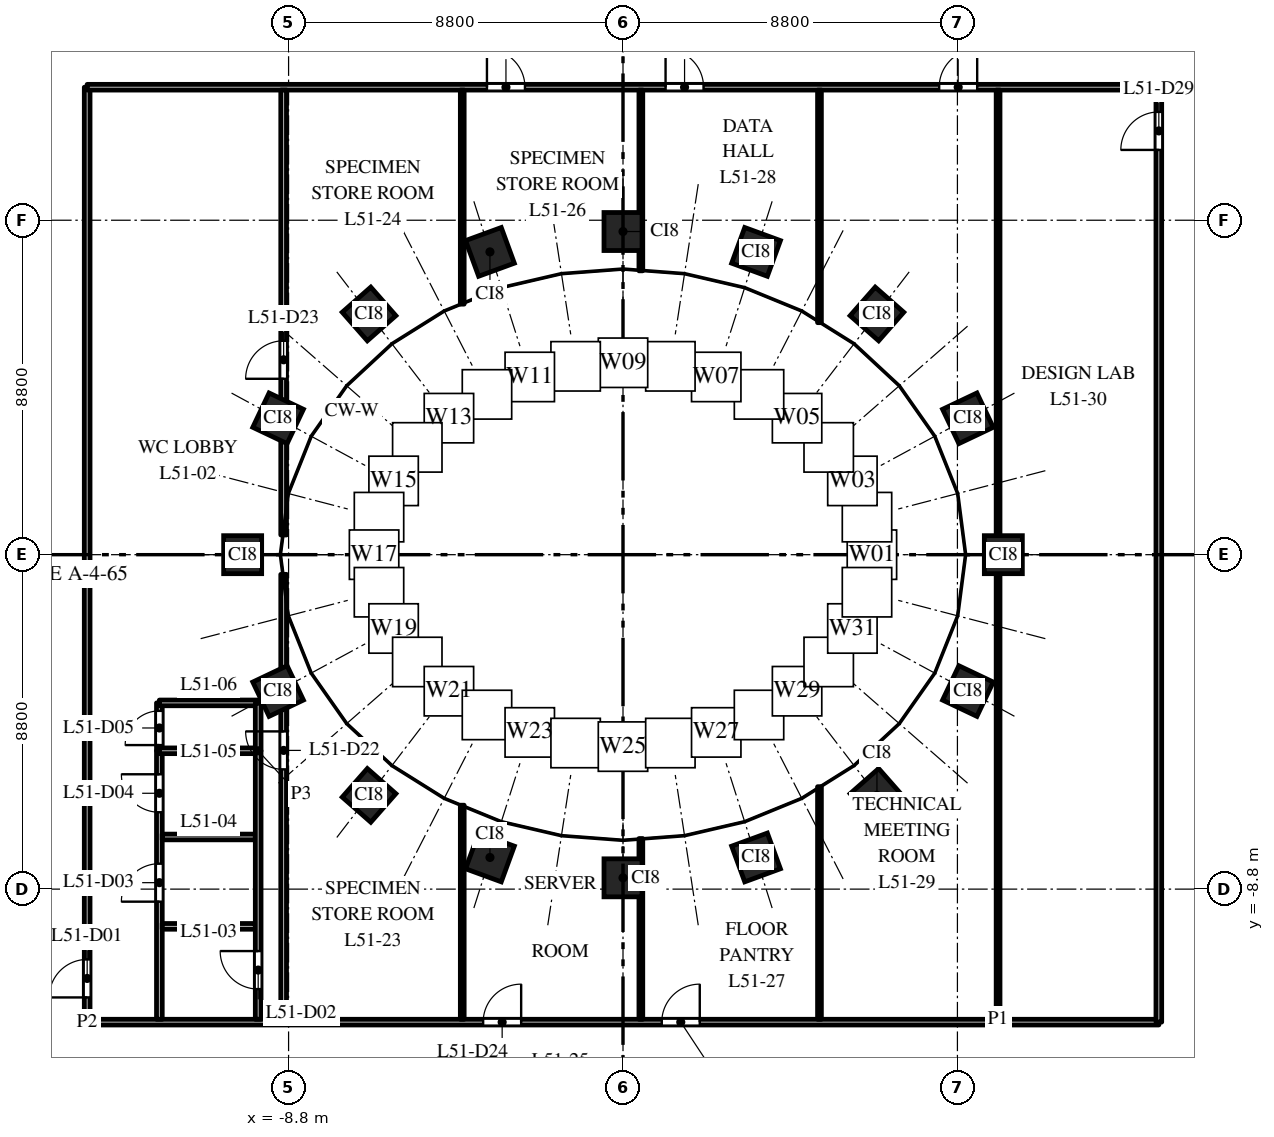
"""IFC4 building model, lengths in metres.
Left out: names, types, materials, properties, quantities, classifications, styles, units other than length and angle.
Written with IfcOpenShell. Run it as: python <this file> out.ifc"""

import sys

from ifc_helpers import new_model, si_unit, direction, frame, frame_2d, origin, origin_2d, place, context, subcontext, project, spatial, rectangle, extrude, element, fill, save


model = new_model("IFC4")
c1 = context("Model", 3, precision=1e-05, world=origin(), true_north=direction((0.0, 1.0)))
c2 = subcontext(c1, "Body", "Model", "MODEL_VIEW")
j1 = project(units=[si_unit("LENGTHUNIT", "METRE"), si_unit("PLANEANGLEUNIT", "RADIAN")], contexts=[c1])
p1 = place(None, origin())
s1 = spatial("IfcSite", under=j1, at=p1, CompositionType="ELEMENT")
p2 = place(p1, origin())
s2 = spatial("IfcBuilding", under=s1, at=p2, CompositionType="ELEMENT")
p3 = place(p2, frame((0.0, 0.0, 245.5)))
s3 = spatial("IfcBuildingStorey", under=s2, at=p3, CompositionType="ELEMENT", Elevation=245.5)
for number, where, z_axis, x_axis in (
    (1, (10.008, 0.0, 0.0), (0.0, 0.0, 1.0), (0.0, 1.0, 0.0)),
    (2, (9.076, 3.588, 0.0), (0.0, 0.0, 1.0), (-0.429, 0.903, 0.0)),
    (3, (6.682, 6.334, 0.0), (0.0, 0.0, 1.0), (-0.751, 0.66, 0.0)),
    (4, (3.501, 7.967, 0.0), (0.0, 0.0, 1.0), (-0.939, 0.344, 0.0)),
    (5, (0.0, 8.503, 0.0), (0.0, 0.0, 1.0), (-1.0, 0.0, 0.0)),
    (6, (-3.501, 7.967, 0.0), (0.0, 0.0, 1.0), (-0.939, -0.344, 0.0)),
    (7, (-6.682, 6.334, 0.0), (0.0, 0.0, 1.0), (-0.751, -0.66, 0.0)),
    (8, (-9.076, 3.588, 0.0), (0.0, 0.0, 1.0), (-0.429, -0.903, 0.0)),
    (9, (-10.008, 0.0, 0.0), (0.0, 0.0, 1.0), (0.0, -1.0, 0.0)),
    (10, (-9.076, -3.588, 0.0), (0.0, 0.0, 1.0), (0.429, -0.903, 0.0)),
    (11, (-6.682, -6.334, 0.0), (0.0, 0.0, 1.0), (0.751, -0.66, 0.0)),
    (12, (-3.501, -7.967, 0.0), (0.0, 0.0, 1.0), (0.939, -0.344, 0.0)),
    (13, (0.0, -8.503, 0.0), (0.0, 0.0, 1.0), (1.0, 0.0, 0.0)),
    (14, (3.501, -7.967, 0.0), (0.0, 0.0, 1.0), (0.939, 0.344, 0.0)),
    (15, (6.682, -6.334, 0.0), (0.0, 0.0, 1.0), (0.751, 0.66, 0.0)),
    (16, (9.076, -3.588, 0.0), (0.0, 0.0, 1.0), (0.429, 0.903, 0.0)),
):
    element("IfcColumn", number, at=place(p3, frame(where, z_axis=z_axis, x_axis=x_axis)), inside=s3, PredefinedType="COLUMN", context=c2, shape_type="SweptSolid", body=[
        extrude(rectangle(XDim=1.0, YDim=1.0, at=origin_2d()), origin(), (0.0, 0.0, 1.0), 4.0),
    ])
p4 = place(p3, frame((-14.1, -12.3, 0.0), z_axis=(0.0, 0.0, 1.0), x_axis=(0.0, 1.0, 0.0)))
e17 = element("IfcWall", 17, at=p4, inside=s3, PredefinedType="PARTITIONING", context=c2, shape_type="SweptSolid", body=[
    extrude(rectangle(XDim=24.6, YDim=0.15, at=frame_2d((12.3, 0.0))), origin(), (0.0, 0.0, 1.0), 2.75),
])
p5 = place(p4, frame((0.65, 0.0, 0.0)))
e18 = element("IfcOpeningElement", 18, at=p5, cuts=e17, PredefinedType="OPENING", context=c2, shape_type="SweptSolid", body=[
    extrude(rectangle(XDim=1.0, YDim=2.1, at=frame_2d((0.5, 1.05))), frame((0.0, 0.085, 0.0), z_axis=(0.0, -1.0, 0.0), x_axis=(1.0, 0.0, 0.0)), (0.0, 0.0, 1.0), 0.17),
])
p6 = place(p3, frame((-14.1, -12.3, 0.0), z_axis=(0.0, 0.0, 1.0), x_axis=(1.0, 0.0, 0.0)))
e19 = element("IfcWall", 19, at=p6, inside=s3, PredefinedType="PARTITIONING", context=c2, shape_type="SweptSolid", body=[
    extrude(rectangle(XDim=28.2, YDim=0.15, at=frame_2d((14.1, 0.0))), origin(), (0.0, 0.0, 1.0), 2.85),
])
p7 = place(p6, frame((10.42, 0.0, 0.0)))
e20 = element("IfcOpeningElement", 20, at=p7, cuts=e19, PredefinedType="OPENING", context=c2, shape_type="SweptSolid", body=[
    extrude(rectangle(XDim=1.0, YDim=2.1, at=frame_2d((0.5, 1.05))), frame((0.0, 0.085, 0.0), z_axis=(0.0, -1.0, 0.0), x_axis=(1.0, 0.0, 0.0)), (0.0, 0.0, 1.0), 0.17),
])
p8 = place(p6, frame((15.12, 0.0, 0.0)))
e21 = element("IfcOpeningElement", 21, at=p8, cuts=e19, PredefinedType="OPENING", context=c2, shape_type="SweptSolid", body=[
    extrude(rectangle(XDim=1.0, YDim=2.1, at=frame_2d((0.5, 1.05))), frame((0.0, 0.085, 0.0), z_axis=(0.0, -1.0, 0.0), x_axis=(1.0, 0.0, 0.0)), (0.0, 0.0, 1.0), 0.17),
])
p9 = place(p3, frame((-14.1, 12.3, 0.0), z_axis=(0.0, 0.0, 1.0), x_axis=(1.0, 0.0, 0.0)))
e22 = element("IfcWall", 22, at=p9, inside=s3, PredefinedType="PARTITIONING", context=c2, shape_type="SweptSolid", body=[
    extrude(rectangle(XDim=28.2, YDim=0.15, at=frame_2d((14.1, 0.0))), origin(), (0.0, 0.0, 1.0), 2.85),
])
p10 = place(p9, frame((10.52, 0.0, 0.0)))
e23 = element("IfcOpeningElement", 23, at=p10, cuts=e22, PredefinedType="OPENING", context=c2, shape_type="SweptSolid", body=[
    extrude(rectangle(XDim=1.0, YDim=2.1, at=frame_2d((0.5, 1.05))), frame((0.0, 0.085, 0.0), z_axis=(0.0, -1.0, 0.0), x_axis=(1.0, 0.0, 0.0)), (0.0, 0.0, 1.0), 0.17),
])
p11 = place(p9, frame((15.22, 0.0, 0.0)))
e24 = element("IfcOpeningElement", 24, at=p11, cuts=e22, PredefinedType="OPENING", context=c2, shape_type="SweptSolid", body=[
    extrude(rectangle(XDim=1.0, YDim=2.1, at=frame_2d((0.5, 1.05))), frame((0.0, 0.085, 0.0), z_axis=(0.0, -1.0, 0.0), x_axis=(1.0, 0.0, 0.0)), (0.0, 0.0, 1.0), 0.17),
])
p12 = place(p9, frame((22.42, 0.0, 0.0)))
e25 = element("IfcOpeningElement", 25, at=p12, cuts=e22, PredefinedType="OPENING", context=c2, shape_type="SweptSolid", body=[
    extrude(rectangle(XDim=1.0, YDim=2.1, at=frame_2d((0.5, 1.05))), frame((0.0, 0.085, 0.0), z_axis=(0.0, -1.0, 0.0), x_axis=(1.0, 0.0, 0.0)), (0.0, 0.0, 1.0), 0.17),
])
p13 = place(p3, frame((-12.2, -12.225, 0.0), z_axis=(0.0, 0.0, 1.0), x_axis=(0.0, 1.0, 0.0)))
e26 = element("IfcWall", 26, at=p13, inside=s3, PredefinedType="PARTITIONING", context=c2, shape_type="SweptSolid", body=[
    extrude(rectangle(XDim=7.065, YDim=0.15, at=frame_2d((3.533, 0.0))), origin(), (0.0, 0.0, 1.0), 2.75),
])
p14 = place(p13, frame((3.095, 0.0, 0.0)))
e27 = element("IfcOpeningElement", 27, at=p14, cuts=e26, PredefinedType="OPENING", context=c2, shape_type="SweptSolid", body=[
    extrude(rectangle(XDim=1.0, YDim=2.1, at=frame_2d((0.5, 1.05))), frame((0.0, 0.085, 0.0), z_axis=(0.0, -1.0, 0.0), x_axis=(1.0, 0.0, 0.0)), (0.0, 0.0, 1.0), 0.17),
])
p15 = place(p13, frame((5.447, 0.0, 0.0)))
e28 = element("IfcOpeningElement", 28, at=p15, cuts=e26, PredefinedType="OPENING", context=c2, shape_type="SweptSolid", body=[
    extrude(rectangle(XDim=1.0, YDim=2.1, at=frame_2d((0.5, 1.05))), frame((0.0, 0.085, 0.0), z_axis=(0.0, -1.0, 0.0), x_axis=(1.0, 0.0, 0.0)), (0.0, 0.0, 1.0), 0.17),
])
p16 = place(p3, frame((-12.125, -9.78, 0.0), z_axis=(0.0, 0.0, 1.0), x_axis=(1.0, 0.0, 0.0)))
e29 = element("IfcWall", 29, at=p16, inside=s3, PredefinedType="PARTITIONING", context=c2, shape_type="SweptSolid", body=[
    extrude(rectangle(XDim=2.45, YDim=0.15, at=frame_2d((1.225, 0.0))), origin(), (0.0, 0.0, 1.0), 3.7),
])
p17 = place(p3, frame((-12.125, -7.428, 0.0), z_axis=(0.0, 0.0, 1.0), x_axis=(1.0, 0.0, 0.0)))
e30 = element("IfcWall", 30, at=p17, inside=s3, PredefinedType="PARTITIONING", context=c2, shape_type="SweptSolid", body=[
    extrude(rectangle(XDim=2.45, YDim=0.15, at=frame_2d((1.225, 0.0))), origin(), (0.0, 0.0, 1.0), 2.75),
])
p18 = place(p3, frame((-12.2, -5.16, 0.0), z_axis=(0.0, 0.0, 1.0), x_axis=(0.0, 1.0, 0.0)))
e31 = element("IfcWall", 31, at=p18, inside=s3, PredefinedType="PARTITIONING", context=c2, shape_type="SweptSolid", body=[
    extrude(rectangle(XDim=1.26, YDim=0.15, at=frame_2d((0.63, 0.0))), origin(), (0.0, 0.0, 1.0), 3.7),
])
p19 = place(p18, frame((0.15, 0.0, 0.0)))
e32 = element("IfcOpeningElement", 32, at=p19, cuts=e31, PredefinedType="OPENING", context=c2, shape_type="SweptSolid", body=[
    extrude(rectangle(XDim=0.9, YDim=2.1, at=frame_2d((0.45, 1.05))), frame((0.0, 0.085, 0.0), z_axis=(0.0, -1.0, 0.0), x_axis=(1.0, 0.0, 0.0)), (0.0, 0.0, 1.0), 0.17),
])
p20 = place(p3, frame((-12.2, -5.16, 0.0), z_axis=(0.0, 0.0, 1.0), x_axis=(1.0, 0.0, 0.0)))
e33 = element("IfcWall", 33, at=p20, inside=s3, PredefinedType="PARTITIONING", context=c2, shape_type="SweptSolid", body=[
    extrude(rectangle(XDim=2.6, YDim=0.15, at=frame_2d((1.3, 0.0))), origin(), (0.0, 0.0, 1.0), 3.7),
])
p21 = place(p3, frame((-12.2, -3.9, 0.0), z_axis=(0.0, 0.0, 1.0), x_axis=(1.0, 0.0, 0.0)))
e34 = element("IfcWall", 34, at=p21, inside=s3, PredefinedType="PARTITIONING", context=c2, shape_type="SweptSolid", body=[
    extrude(rectangle(XDim=2.596, YDim=0.15, at=frame_2d((1.298, 0.0))), origin(), (0.0, 0.0, 1.0), 3.7),
])
p22 = place(p3, frame((-9.6, -12.225, 0.0), z_axis=(0.0, 0.0, 1.0), x_axis=(0.0, 1.0, 0.0)))
e35 = element("IfcWall", 35, at=p22, inside=s3, PredefinedType="PARTITIONING", context=c2, shape_type="SweptSolid", body=[
    extrude(rectangle(XDim=7.065, YDim=0.15, at=frame_2d((3.533, 0.0))), origin(), (0.0, 0.0, 1.0), 2.75),
])
p23 = place(p22, frame((0.795, 0.0, 0.0)))
e36 = element("IfcOpeningElement", 36, at=p23, cuts=e35, PredefinedType="OPENING", context=c2, shape_type="SweptSolid", body=[
    extrude(rectangle(XDim=1.0, YDim=2.1, at=frame_2d((0.5, 1.05))), frame((0.0, 0.085, 0.0), z_axis=(0.0, -1.0, 0.0), x_axis=(1.0, 0.0, 0.0)), (0.0, 0.0, 1.0), 0.17),
])
p24 = place(p3, frame((-9.6, -5.16, 0.0), z_axis=(0.0, 0.0, 1.0), x_axis=(0.0, 1.0, 0.0)))
e37 = element("IfcWall", 37, at=p24, inside=s3, PredefinedType="PARTITIONING", context=c2, shape_type="SweptSolid", body=[
    extrude(rectangle(XDim=1.256, YDim=0.15, at=frame_2d((0.628, 0.0))), origin(), (0.0, 0.0, 1.0), 3.7),
])
p25 = place(p3, frame((-8.93, -12.225, 0.0), z_axis=(0.0, 0.0, 1.0), x_axis=(0.0, 1.0, 0.0)))
e38 = element("IfcWall", 38, at=p25, inside=s3, PredefinedType="PARTITIONING", context=c2, shape_type="SweptSolid", body=[
    extrude(rectangle(XDim=11.707, YDim=0.15, at=frame_2d((5.854, 0.0))), origin(), (0.0, 0.0, 1.0), 2.75),
])
p26 = place(p25, frame((6.575, 0.0, 0.0)))
e39 = element("IfcOpeningElement", 39, at=p26, cuts=e38, PredefinedType="OPENING", context=c2, shape_type="SweptSolid", body=[
    extrude(rectangle(XDim=1.0, YDim=2.1, at=frame_2d((0.5, 1.05))), frame((0.0, 0.085, 0.0), z_axis=(0.0, -1.0, 0.0), x_axis=(1.0, 0.0, 0.0)), (0.0, 0.0, 1.0), 0.17),
])
p27 = place(p3, frame((-8.93, 0.518, 0.0), z_axis=(0.0, 0.0, 1.0), x_axis=(0.0, 1.0, 0.0)))
e40 = element("IfcWall", 40, at=p27, inside=s3, PredefinedType="PARTITIONING", context=c2, shape_type="SweptSolid", body=[
    extrude(rectangle(XDim=11.707, YDim=0.15, at=frame_2d((5.854, 0.0))), origin(), (0.0, 0.0, 1.0), 2.75),
])
p28 = place(p27, frame((4.11, 0.0, 0.0)))
e41 = element("IfcOpeningElement", 41, at=p28, cuts=e40, PredefinedType="OPENING", context=c2, shape_type="SweptSolid", body=[
    extrude(rectangle(XDim=1.0, YDim=2.1, at=frame_2d((0.5, 1.05))), frame((0.0, 0.085, 0.0), z_axis=(0.0, -1.0, 0.0), x_axis=(1.0, 0.0, 0.0)), (0.0, 0.0, 1.0), 0.17),
])
for number, where, z_axis, x_axis in (
    (42, (-4.23, -12.225, 0.0), (0.0, 0.0, 1.0), (0.0, 1.0, 0.0)),
    (43, (-4.23, 6.592, 0.0), (0.0, 0.0, 1.0), (0.0, 1.0, 0.0)),
):
    element("IfcWall", number, at=place(p3, frame(where, z_axis=z_axis, x_axis=x_axis)), inside=s3, PredefinedType="PARTITIONING", context=c2, shape_type="SweptSolid", body=[
        extrude(rectangle(XDim=5.633, YDim=0.1, at=frame_2d((2.816, 0.0))), origin(), (0.0, 0.0, 1.0), 2.85),
    ])
for number, where, z_axis, x_axis in (
    (44, (0.47, -12.225, 0.0), (0.0, 0.0, 1.0), (0.0, 1.0, 0.0)),
    (45, (0.47, 7.469, 0.0), (0.0, 0.0, 1.0), (0.0, 1.0, 0.0)),
):
    element("IfcWall", number, at=place(p3, frame(where, z_axis=z_axis, x_axis=x_axis)), inside=s3, PredefinedType="PARTITIONING", context=c2, shape_type="SweptSolid", body=[
        extrude(rectangle(XDim=4.756, YDim=0.1, at=frame_2d((2.378, 0.0))), origin(), (0.0, 0.0, 1.0), 3.0),
    ])
for number, where, z_axis, x_axis in (
    (46, (5.17, -12.225, 0.0), (0.0, 0.0, 1.0), (0.0, 1.0, 0.0)),
    (47, (5.17, 6.105, 0.0), (0.0, 0.0, 1.0), (0.0, 1.0, 0.0)),
):
    element("IfcWall", number, at=place(p3, frame(where, z_axis=z_axis, x_axis=x_axis)), inside=s3, PredefinedType="PARTITIONING", context=c2, shape_type="SweptSolid", body=[
        extrude(rectangle(XDim=6.12, YDim=0.1, at=frame_2d((3.06, 0.0))), origin(), (0.0, 0.0, 1.0), 2.85),
    ])
p29 = place(p3, frame((9.87, -12.225, 0.0), z_axis=(0.0, 0.0, 1.0), x_axis=(0.0, 1.0, 0.0)))
e48 = element("IfcWall", 48, at=p29, inside=s3, PredefinedType="PARTITIONING", context=c2, shape_type="SweptSolid", body=[
    extrude(rectangle(XDim=24.45, YDim=0.1, at=frame_2d((12.225, 0.0))), origin(), (0.0, 0.0, 1.0), 2.75),
])
p30 = place(p3, frame((14.1, -12.3, 0.0), z_axis=(0.0, 0.0, 1.0), x_axis=(0.0, 1.0, 0.0)))
e49 = element("IfcWall", 49, at=p30, inside=s3, PredefinedType="PARTITIONING", context=c2, shape_type="SweptSolid", body=[
    extrude(rectangle(XDim=24.6, YDim=0.15, at=frame_2d((12.3, 0.0))), origin(), (0.0, 0.0, 1.0), 2.75),
])
p31 = place(p30, frame((22.95, 0.0, 0.0)))
e50 = element("IfcOpeningElement", 50, at=p31, cuts=e49, PredefinedType="OPENING", context=c2, shape_type="SweptSolid", body=[
    extrude(rectangle(XDim=1.0, YDim=2.1, at=frame_2d((0.5, 1.05))), frame((0.0, 0.085, 0.0), z_axis=(0.0, -1.0, 0.0), x_axis=(1.0, 0.0, 0.0)), (0.0, 0.0, 1.0), 0.17),
])
p32 = place(p5, origin())
e51 = element("IfcDoor", 51, at=p32, inside=s3, OperationType="SINGLE_SWING_LEFT", PredefinedType="DOOR", context=c2, shape_type="SweptSolid", body=[
    extrude(rectangle(XDim=1.0, YDim=2.1, at=frame_2d((0.5, 1.05))), frame((0.0, 0.025, 0.0), z_axis=(0.0, -1.0, 0.0), x_axis=(1.0, 0.0, 0.0)), (0.0, 0.0, 1.0), 0.05),
])
fill(e18, e51)
p33 = place(p23, origin())
e52 = element("IfcDoor", 52, at=p33, inside=s3, OperationType="SINGLE_SWING_RIGHT", PredefinedType="DOOR", context=c2, shape_type="SweptSolid", body=[
    extrude(rectangle(XDim=1.0, YDim=2.1, at=frame_2d((0.5, 1.05))), frame((0.0, 0.025, 0.0), z_axis=(0.0, -1.0, 0.0), x_axis=(1.0, 0.0, 0.0)), (0.0, 0.0, 1.0), 0.05),
])
fill(e36, e52)
p34 = place(p14, origin())
e53 = element("IfcDoor", 53, at=p34, inside=s3, OperationType="SINGLE_SWING_LEFT", PredefinedType="DOOR", context=c2, shape_type="SweptSolid", body=[
    extrude(rectangle(XDim=1.0, YDim=2.1, at=frame_2d((0.5, 1.05))), frame((0.0, 0.025, 0.0), z_axis=(0.0, -1.0, 0.0), x_axis=(1.0, 0.0, 0.0)), (0.0, 0.0, 1.0), 0.05),
])
fill(e27, e53)
p35 = place(p15, origin())
e54 = element("IfcDoor", 54, at=p35, inside=s3, OperationType="SINGLE_SWING_RIGHT", PredefinedType="DOOR", context=c2, shape_type="SweptSolid", body=[
    extrude(rectangle(XDim=1.0, YDim=2.1, at=frame_2d((0.5, 1.05))), frame((0.0, 0.025, 0.0), z_axis=(0.0, -1.0, 0.0), x_axis=(1.0, 0.0, 0.0)), (0.0, 0.0, 1.0), 0.05),
])
fill(e28, e54)
p36 = place(p19, origin())
e55 = element("IfcDoor", 55, at=p36, inside=s3, OperationType="SINGLE_SWING_LEFT", PredefinedType="DOOR", context=c2, shape_type="SweptSolid", body=[
    extrude(rectangle(XDim=0.9, YDim=2.1, at=frame_2d((0.45, 1.05))), frame((0.0, 0.025, 0.0), z_axis=(0.0, -1.0, 0.0), x_axis=(1.0, 0.0, 0.0)), (0.0, 0.0, 1.0), 0.05),
])
fill(e32, e55)
p37 = place(p26, origin())
e56 = element("IfcDoor", 56, at=p37, inside=s3, OperationType="SINGLE_SWING_RIGHT", PredefinedType="DOOR", context=c2, shape_type="SweptSolid", body=[
    extrude(rectangle(XDim=1.0, YDim=2.1, at=frame_2d((0.5, 1.05))), frame((0.0, 0.025, 0.0), z_axis=(0.0, -1.0, 0.0), x_axis=(1.0, 0.0, 0.0)), (0.0, 0.0, 1.0), 0.05),
])
fill(e39, e56)
p38 = place(p28, origin())
e57 = element("IfcDoor", 57, at=p38, inside=s3, OperationType="SINGLE_SWING_LEFT", PredefinedType="DOOR", context=c2, shape_type="SweptSolid", body=[
    extrude(rectangle(XDim=1.0, YDim=2.1, at=frame_2d((0.5, 1.05))), frame((0.0, 0.025, 0.0), z_axis=(0.0, -1.0, 0.0), x_axis=(1.0, 0.0, 0.0)), (0.0, 0.0, 1.0), 0.05),
])
fill(e41, e57)
p39 = place(p7, origin())
e58 = element("IfcDoor", 58, at=p39, inside=s3, OperationType="SINGLE_SWING_RIGHT", PredefinedType="DOOR", context=c2, shape_type="SweptSolid", body=[
    extrude(rectangle(XDim=1.0, YDim=2.1, at=frame_2d((0.5, 1.05))), frame((0.0, 0.025, 0.0), z_axis=(0.0, -1.0, 0.0), x_axis=(1.0, 0.0, 0.0)), (0.0, 0.0, 1.0), 0.05),
])
fill(e20, e58)
p40 = place(p10, origin())
e59 = element("IfcDoor", 59, at=p40, inside=s3, OperationType="SINGLE_SWING_LEFT", PredefinedType="DOOR", context=c2, shape_type="SweptSolid", body=[
    extrude(rectangle(XDim=1.0, YDim=2.1, at=frame_2d((0.5, 1.05))), frame((0.0, 0.025, 0.0), z_axis=(0.0, -1.0, 0.0), x_axis=(1.0, 0.0, 0.0)), (0.0, 0.0, 1.0), 0.05),
])
fill(e23, e59)
p41 = place(p8, origin())
e60 = element("IfcDoor", 60, at=p41, inside=s3, OperationType="SINGLE_SWING_RIGHT", PredefinedType="DOOR", context=c2, shape_type="SweptSolid", body=[
    extrude(rectangle(XDim=1.0, YDim=2.1, at=frame_2d((0.5, 1.05))), frame((0.0, 0.025, 0.0), z_axis=(0.0, -1.0, 0.0), x_axis=(1.0, 0.0, 0.0)), (0.0, 0.0, 1.0), 0.05),
])
fill(e21, e60)
p42 = place(p11, origin())
e61 = element("IfcDoor", 61, at=p42, inside=s3, OperationType="SINGLE_SWING_LEFT", PredefinedType="DOOR", context=c2, shape_type="SweptSolid", body=[
    extrude(rectangle(XDim=1.0, YDim=2.1, at=frame_2d((0.5, 1.05))), frame((0.0, 0.025, 0.0), z_axis=(0.0, -1.0, 0.0), x_axis=(1.0, 0.0, 0.0)), (0.0, 0.0, 1.0), 0.05),
])
fill(e24, e61)
p43 = place(p12, origin())
e62 = element("IfcDoor", 62, at=p43, inside=s3, OperationType="SINGLE_SWING_RIGHT", PredefinedType="DOOR", context=c2, shape_type="SweptSolid", body=[
    extrude(rectangle(XDim=1.0, YDim=2.1, at=frame_2d((0.5, 1.05))), frame((0.0, 0.025, 0.0), z_axis=(0.0, -1.0, 0.0), x_axis=(1.0, 0.0, 0.0)), (0.0, 0.0, 1.0), 0.05),
])
fill(e25, e62)
p44 = place(p31, origin())
e63 = element("IfcDoor", 63, at=p44, inside=s3, OperationType="SINGLE_SWING_LEFT", PredefinedType="DOOR", context=c2, shape_type="SweptSolid", body=[
    extrude(rectangle(XDim=1.0, YDim=2.1, at=frame_2d((0.5, 1.05))), frame((0.0, 0.025, 0.0), z_axis=(0.0, -1.0, 0.0), x_axis=(1.0, 0.0, 0.0)), (0.0, 0.0, 1.0), 0.05),
])
fill(e50, e63)
save(model, sys.argv[1])
